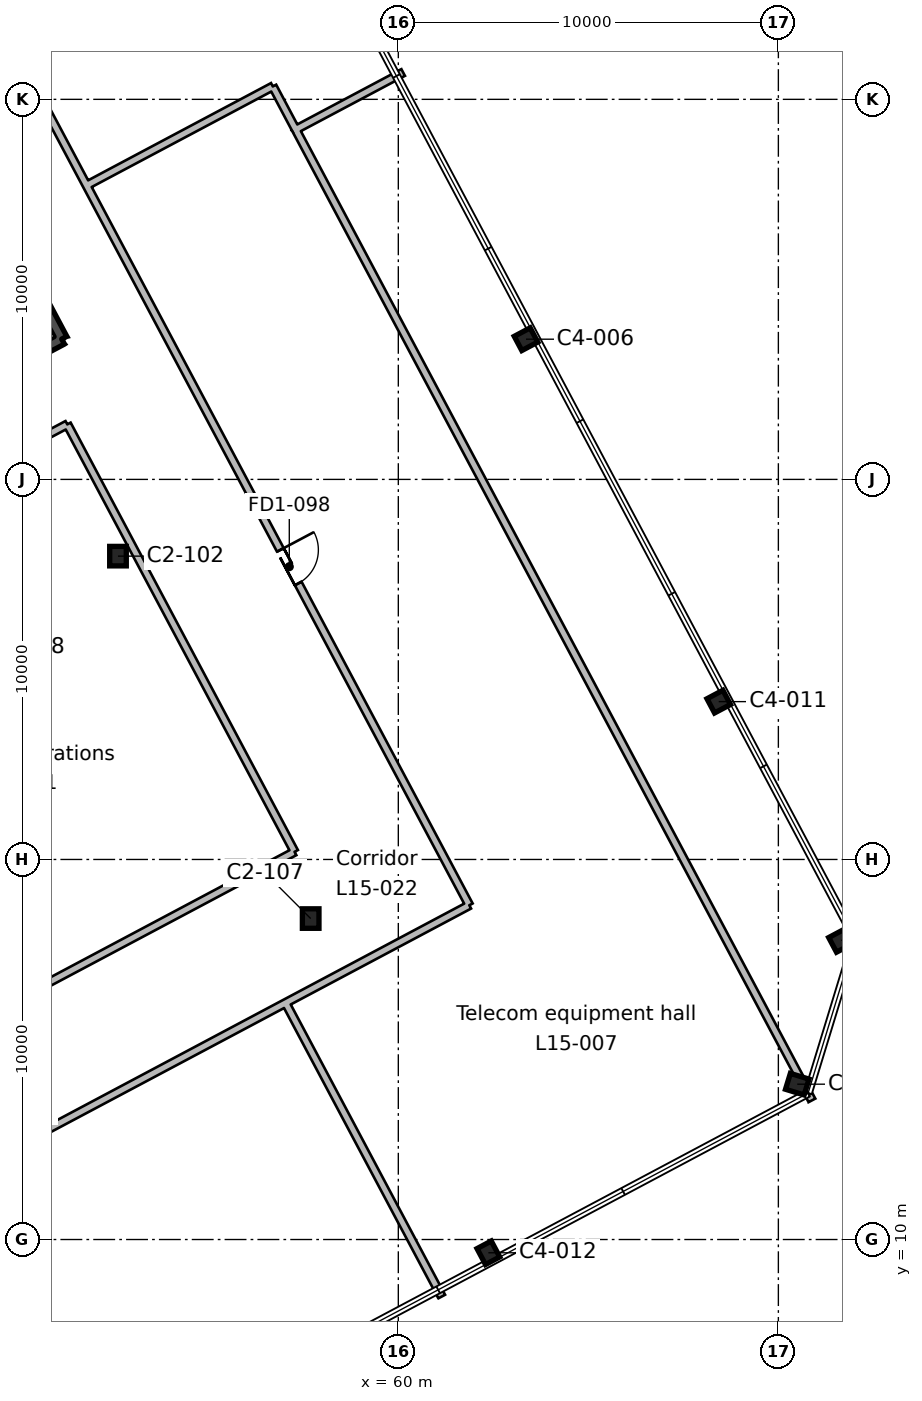
"""IFC4 building model, lengths in metres.
Left out: names, types, materials, properties, quantities, classifications, styles, units other than length and angle.
Written with IfcOpenShell. Run it as: python <this file> out.ifc"""

import sys

from ifc_helpers import new_model, si_unit, direction, frame, frame_2d, origin, origin_2d, place, context, subcontext, project, spatial, rectangle, i_section, extrude, element, fill, save


model = new_model("IFC4")
c1 = context("Model", 3, precision=1e-05, world=origin(), true_north=direction((0.0, 1.0)))
c2 = subcontext(c1, "Body", "Model", "MODEL_VIEW")
j1 = project(units=[si_unit("LENGTHUNIT", "METRE"), si_unit("PLANEANGLEUNIT", "RADIAN")], contexts=[c1])
p1 = place(None, origin())
s1 = spatial("IfcSite", under=j1, at=p1, CompositionType="ELEMENT")
p2 = place(p1, origin())
s2 = spatial("IfcBuilding", under=s1, at=p2, CompositionType="ELEMENT")
p3 = place(p2, frame((0.0, 0.0, 80.0)))
s3 = spatial("IfcBuildingStorey", under=s2, at=p3, CompositionType="ELEMENT", Elevation=80.0)
p4 = place(p3, frame((62.37, 9.651, 0.0), z_axis=(0.0, 0.0, 1.0), x_axis=(0.882947592859, 0.469471562786, 0.0)))
e1 = element("IfcColumn", 1, at=p4, inside=s3, PredefinedType="COLUMN", context=c2, shape_type="SweptSolid", body=[
    extrude(i_section(OverallWidth=0.424, OverallDepth=0.475, WebThickness=0.048, FlangeThickness=0.077, FilletRadius=0.015, at=origin_2d()), origin(), (0.0, 0.0, 1.0), 4.6),
])
for number, where, z_axis, x_axis in (
    (2, (70.497, 14.087, 0.0), (0.0, 0.0, 1.0), (0.292, 0.956, 0.0)),
    (3, (71.654, 17.873, 0.0), (0.0, 0.0, 1.0), (-0.469, 0.883, 0.0)),
    (4, (57.694, 18.445, 0.0), (0.0, 0.0, 1.0), (1.0, 0.0, 0.0)),
):
    element("IfcColumn", number, at=place(p3, frame(where, z_axis=z_axis, x_axis=x_axis)), inside=s3, PredefinedType="COLUMN", context=c2, shape_type="SweptSolid", body=[
        extrude(i_section(OverallWidth=0.437, OverallDepth=0.513, WebThickness=0.061, FlangeThickness=0.097, FilletRadius=0.015, at=origin_2d()), origin(), (0.0, 0.0, 1.0), 4.6),
    ])
p5 = place(p3, frame((68.431, 24.153, 0.0), z_axis=(0.0, 0.0, 1.0), x_axis=(-0.469471562786, 0.882947592859, 0.0)))
e5 = element("IfcColumn", 5, at=p5, inside=s3, PredefinedType="COLUMN", context=c2, shape_type="SweptSolid", body=[
    extrude(i_section(OverallWidth=0.424, OverallDepth=0.475, WebThickness=0.048, FlangeThickness=0.077, FilletRadius=0.015, at=origin_2d()), origin(), (0.0, 0.0, 1.0), 4.6),
])
p6 = place(p3, frame((52.624, 27.981, 0.0), z_axis=(0.0, 0.0, 1.0), x_axis=(1.0, 0.0, 0.0)))
e6 = element("IfcColumn", 6, at=p6, inside=s3, PredefinedType="COLUMN", context=c2, shape_type="SweptSolid", body=[
    extrude(i_section(OverallWidth=0.437, OverallDepth=0.513, WebThickness=0.061, FlangeThickness=0.097, FilletRadius=0.015, at=origin_2d()), origin(), (0.0, 0.0, 1.0), 4.6),
])
p7 = place(p3, frame((63.36, 33.689, 0.0), z_axis=(0.0, 0.0, 1.0), x_axis=(-0.469471562786, 0.882947592859, 0.0)))
e7 = element("IfcColumn", 7, at=p7, inside=s3, PredefinedType="COLUMN", context=c2, shape_type="SweptSolid", body=[
    extrude(i_section(OverallWidth=0.424, OverallDepth=0.475, WebThickness=0.048, FlangeThickness=0.077, FilletRadius=0.015, at=origin_2d()), origin(), (0.0, 0.0, 1.0), 4.6),
])
p8 = place(p3, frame((49.384, 37.004, 0.0), z_axis=(0.0, 0.0, 1.0), x_axis=(0.46946936446, -0.882948761726, 0.0)))
e8 = element("IfcWall", 8, at=p8, inside=s3, PredefinedType="SHEAR", context=c2, shape_type="SweptSolid", body=[
    extrude(rectangle(XDim=3.75, YDim=0.3, at=frame_2d((1.875, 0.0))), origin(), (0.0, 0.0, 1.0), 4.6),
])
p9 = place(p3, frame((51.145, 33.693, 0.0), z_axis=(0.0, 0.0, 1.0), x_axis=(-0.882945809314, -0.469474917132, 0.0)))
e9 = element("IfcWall", 9, at=p9, inside=s3, PredefinedType="SHEAR", context=c2, shape_type="SweptSolid", body=[
    extrude(rectangle(XDim=8.3, YDim=0.3, at=frame_2d((4.15, 0.0))), origin(), (0.0, 0.0, 1.0), 4.6),
])
p10 = place(p9, frame((6.725, 0.0, 0.0)))
e10 = element("IfcOpeningElement", 10, at=p10, cuts=e9, PredefinedType="OPENING", context=c2, shape_type="SweptSolid", body=[
    extrude(rectangle(XDim=1.2, YDim=2.1, at=frame_2d((0.6, 1.05))), frame((0.0, 0.16, 0.0), z_axis=(0.0, -1.0, 0.0), x_axis=(1.0, 0.0, 0.0)), (0.0, 0.0, 1.0), 0.32),
])
p11 = place(p3, frame((57.041, 16.229, 0.0), z_axis=(0.0, 0.0, 1.0), x_axis=(-0.882947975476, -0.469470843188, 0.0)))
e11 = element("IfcWall", 11, at=p11, inside=s3, PredefinedType="PARTITIONING", context=c2, shape_type="SweptSolid", body=[
    extrude(rectangle(XDim=49.2, YDim=0.2, at=frame_2d((24.6, 0.0))), origin(), (0.0, 0.0, 1.0), 4.2),
])
p12 = place(p11, frame((33.25, 0.0, 0.0)))
e12 = element("IfcOpeningElement", 12, at=p12, cuts=e11, PredefinedType="OPENING", context=c2, shape_type="SweptSolid", body=[
    extrude(rectangle(XDim=1.0, YDim=2.1, at=frame_2d((0.5, 1.05))), frame((0.0, 0.11, 0.0), z_axis=(0.0, -1.0, 0.0), x_axis=(1.0, 0.0, 0.0)), (0.0, 0.0, 1.0), 0.22),
])
p13 = place(p11, frame((24.05, 0.0, 0.0)))
e13 = element("IfcOpeningElement", 13, at=p13, cuts=e11, PredefinedType="OPENING", context=c2, shape_type="SweptSolid", body=[
    extrude(rectangle(XDim=1.0, YDim=2.1, at=frame_2d((0.5, 1.05))), frame((0.0, 0.11, 0.0), z_axis=(0.0, -1.0, 0.0), x_axis=(1.0, 0.0, 0.0)), (0.0, 0.0, 1.0), 0.22),
])
p14 = place(p11, frame((20.95, 0.0, 0.0)))
e14 = element("IfcOpeningElement", 14, at=p14, cuts=e11, PredefinedType="OPENING", context=c2, shape_type="SweptSolid", body=[
    extrude(rectangle(XDim=1.0, YDim=2.1, at=frame_2d((0.5, 1.05))), frame((0.0, 0.11, 0.0), z_axis=(0.0, -1.0, 0.0), x_axis=(1.0, 0.0, 0.0)), (0.0, 0.0, 1.0), 0.22),
])
p15 = place(p3, frame((29.26, 35.945, 0.0), z_axis=(0.0, 0.0, 1.0), x_axis=(0.882955510648, 0.469456671288, 0.0)))
e15 = element("IfcWall", 15, at=p15, inside=s3, PredefinedType="PARTITIONING", context=c2, shape_type="SweptSolid", body=[
    extrude(rectangle(XDim=29.507, YDim=0.2, at=frame_2d((14.753, 0.0))), origin(), (0.0, 0.0, 1.0), 4.2),
])
p16 = place(p3, frame((50.178, 40.781, 0.0), z_axis=(0.0, 0.0, 1.0), x_axis=(0.469355564401, -0.883009260521, 0.0)))
e16 = element("IfcWall", 16, at=p16, inside=s3, PredefinedType="PARTITIONING", context=c2, shape_type="SweptSolid", body=[
    extrude(rectangle(XDim=3.445, YDim=0.2, at=frame_2d((1.723, 0.0))), origin(), (0.0, 0.0, 1.0), 4.2),
])
p17 = place(p3, frame((57.034, 16.225, 0.0), z_axis=(0.0, 0.0, 1.0), x_axis=(0.469482945701, -0.882941540361, 0.0)))
e17 = element("IfcWall", 17, at=p17, inside=s3, PredefinedType="PARTITIONING", context=c2, shape_type="SweptSolid", body=[
    extrude(rectangle(XDim=8.75, YDim=0.2, at=frame_2d((4.375, 0.0))), origin(), (0.0, 0.0, 1.0), 4.2),
])
p18 = place(p3, frame((46.434, 28.866, 0.0), z_axis=(0.0, 0.0, 1.0), x_axis=(0.882942083458, 0.469481924316, 0.0)))
e18 = element("IfcWall", 18, at=p18, inside=s3, PredefinedType="PARTITIONING", context=c2, shape_type="SweptSolid", body=[
    extrude(rectangle(XDim=5.5, YDim=0.2, at=frame_2d((2.75, 0.0))), origin(), (0.0, 0.0, 1.0), 4.2),
])
p19 = place(p3, frame((51.29, 31.448, 0.0), z_axis=(0.0, 0.0, 1.0), x_axis=(0.469459757109, -0.882953869947, 0.0)))
e19 = element("IfcWall", 19, at=p19, inside=s3, PredefinedType="PARTITIONING", context=c2, shape_type="SweptSolid", body=[
    extrude(rectangle(XDim=12.738, YDim=0.2, at=frame_2d((6.369, 0.0))), origin(), (0.0, 0.0, 1.0), 4.2),
])
p20 = place(p3, frame((57.27, 20.201, 0.0), z_axis=(0.0, 0.0, 1.0), x_axis=(-0.882965394181, -0.469438081837, 0.0)))
e20 = element("IfcWall", 20, at=p20, inside=s3, PredefinedType="PARTITIONING", context=c2, shape_type="SweptSolid", body=[
    extrude(rectangle(XDim=9.886, YDim=0.2, at=frame_2d((4.943, 0.0))), origin(), (0.0, 0.0, 1.0), 4.2),
])
p21 = place(p3, frame((51.795, 37.739, 0.0), z_axis=(0.0, 0.0, 1.0), x_axis=(0.469473160434, -0.882946743373, 0.0)))
e21 = element("IfcWall", 21, at=p21, inside=s3, PredefinedType="PARTITIONING", context=c2, shape_type="SweptSolid", body=[
    extrude(rectangle(XDim=1.216, YDim=0.2, at=frame_2d((0.608, 0.0))), origin(), (0.0, 0.0, 1.0), 4.2),
])
p22 = place(p3, frame((52.351, 38.029, 0.0), z_axis=(0.0, 0.0, 1.0), x_axis=(0.882969925021, 0.469429559688, 0.0)))
e22 = element("IfcWall", 22, at=p22, inside=s3, PredefinedType="PARTITIONING", context=c2, shape_type="SweptSolid", body=[
    extrude(rectangle(XDim=4.923, YDim=0.2, at=frame_2d((2.461, 0.0))), origin(), (0.0, 0.0, 1.0), 4.2),
])
p23 = place(p3, frame((56.698, 40.34, 0.0), z_axis=(0.0, 0.0, 1.0), x_axis=(0.468946315527, -0.883226671446, 0.0)))
e23 = element("IfcWall", 23, at=p23, inside=s3, PredefinedType="PARTITIONING", context=c2, shape_type="SweptSolid", body=[
    extrude(rectangle(XDim=1.282, YDim=0.2, at=frame_2d((0.641, 0.0))), origin(), (0.0, 0.0, 1.0), 4.2),
])
p24 = place(p3, frame((51.798, 37.734, 0.0), z_axis=(0.0, 0.0, 1.0), x_axis=(0.882191163795, 0.470891442396, 0.0)))
e24 = element("IfcWall", 24, at=p24, inside=s3, PredefinedType="PARTITIONING", context=c2, shape_type="SweptSolid", body=[
    extrude(rectangle(XDim=0.627, YDim=0.2, at=frame_2d((0.313, 0.0))), origin(), (0.0, 0.0, 1.0), 4.2),
])
p25 = place(p3, frame((57.041, 16.229, 0.0), z_axis=(0.0, 0.0, 1.0), x_axis=(0.882918476145, 0.469526319265, 0.0)))
e25 = element("IfcWall", 25, at=p25, inside=s3, PredefinedType="PARTITIONING", context=c2, shape_type="SweptSolid", body=[
    extrude(rectangle(XDim=5.467, YDim=0.2, at=frame_2d((2.733, 0.0))), origin(), (0.0, 0.0, 1.0), 4.2),
])
p26 = place(p3, frame((52.366, 36.665, 0.0), z_axis=(0.0, 0.0, 1.0), x_axis=(0.469480933333, -0.882942610387, 0.0)))
e26 = element("IfcWall", 26, at=p26, inside=s3, PredefinedType="PARTITIONING", context=c2, shape_type="SweptSolid", body=[
    extrude(rectangle(XDim=20.239, YDim=0.2, at=frame_2d((10.12, 0.0))), origin(), (0.0, 0.0, 1.0), 4.2),
])
p27 = place(p26, frame((9.65, 0.0, 0.0)))
e27 = element("IfcOpeningElement", 27, at=p27, cuts=e26, PredefinedType="OPENING", context=c2, shape_type="SweptSolid", body=[
    extrude(rectangle(XDim=1.0, YDim=2.1, at=frame_2d((0.5, 1.05))), frame((0.0, 0.11, 0.0), z_axis=(0.0, -1.0, 0.0), x_axis=(1.0, 0.0, 0.0)), (0.0, 0.0, 1.0), 0.22),
])
p28 = place(p3, frame((57.299, 39.208, 0.0), z_axis=(0.0, 0.0, 1.0), x_axis=(0.469480728433, -0.882942719337, 0.0)))
e28 = element("IfcWall", 28, at=p28, inside=s3, PredefinedType="PARTITIONING", context=c2, shape_type="SweptSolid", body=[
    extrude(rectangle(XDim=28.934, YDim=0.2, at=frame_2d((14.467, 0.0))), origin(), (0.0, 0.0, 1.0), 4.2),
])
p29 = place(p3, frame((60.127, 40.707, 0.0), z_axis=(0.0, 0.0, 1.0), x_axis=(-0.883027796121, -0.469320691295, 0.0)))
e29 = element("IfcWall", 29, at=p29, inside=s3, PredefinedType="PARTITIONING", context=c2, shape_type="SweptSolid", body=[
    extrude(rectangle(XDim=3.2, YDim=0.2, at=frame_2d((1.6, 0.0))), origin(), (0.0, 0.0, 1.0), 4.2),
])
p30 = place(p27, origin())
e30 = element("IfcDoor", 30, at=p30, inside=s3, OperationType="SINGLE_SWING_LEFT", PredefinedType="DOOR", context=c2, shape_type="SweptSolid", body=[
    extrude(rectangle(XDim=1.0, YDim=2.1, at=frame_2d((0.5, 1.05))), frame((0.0, 0.025, 0.0), z_axis=(0.0, -1.0, 0.0), x_axis=(1.0, 0.0, 0.0)), (0.0, 0.0, 1.0), 0.05),
])
fill(e27, e30)
save(model, sys.argv[1])
